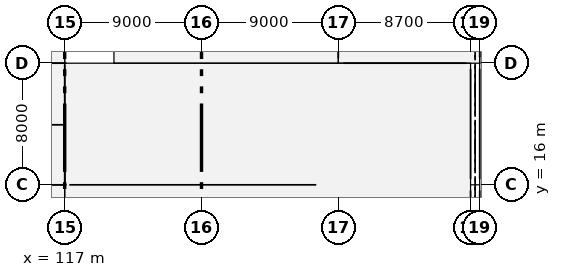
"""IFC4 building model, lengths in metres.
Left out: names, types, materials, properties, quantities, classifications, styles, units other than length and angle.
Written with IfcOpenShell. Run it as: python <this file> out.ifc"""

import sys

from ifc_helpers import new_model, si_unit, direction, frame, frame_2d, origin, origin_2d, place, context, subcontext, project, spatial, rectangle, hollow_rectangle, extrude, element, fill, save


model = new_model("IFC4")
c1 = context("Model", 3, precision=1e-05, world=origin(), true_north=direction((0.0, 1.0)))
c2 = subcontext(c1, "Body", "Model", "MODEL_VIEW")
j1 = project(units=[si_unit("LENGTHUNIT", "METRE"), si_unit("PLANEANGLEUNIT", "RADIAN")], contexts=[c1])
p1 = place(None, origin())
s1 = spatial("IfcSite", under=j1, at=p1, CompositionType="ELEMENT")
p2 = place(p1, origin())
s2 = spatial("IfcBuilding", under=s1, at=p2, CompositionType="ELEMENT")
p3 = place(p2, origin())
s3 = spatial("IfcBuildingStorey", under=s2, at=p3, CompositionType="ELEMENT", Elevation=0.0)
for number, where, z_axis, x_axis in (
    (1, (117.0, 16.0, -0.5), (0.0, 0.0, 1.0), (1.0, 0.0, 0.0)),
    (2, (117.0, 24.0, -0.5), (0.0, 0.0, 1.0), (1.0, 0.0, 0.0)),
    (3, (126.0, 16.0, -0.5), (0.0, 0.0, 1.0), (1.0, 0.0, 0.0)),
    (4, (126.0, 24.0, -0.5), (0.0, 0.0, 1.0), (1.0, 0.0, 0.0)),
    (5, (135.0, 16.0, -0.5), (0.0, 0.0, 1.0), (1.0, 0.0, 0.0)),
    (6, (135.0, 24.0, -0.5), (0.0, 0.0, 1.0), (1.0, 0.0, 0.0)),
):
    element("IfcColumn", number, at=place(p3, frame(where, z_axis=z_axis, x_axis=x_axis)), inside=s3, PredefinedType="COLUMN", context=c2, shape_type="SweptSolid", body=[
        extrude(rectangle(XDim=0.65, YDim=0.65, at=origin_2d()), origin(), (0.0, 0.0, 1.0), 6.8),
    ])
for number, where, z_axis, x_axis in (
    (7, (143.7, 16.0, -0.5), (0.0, 0.0, 1.0), (1.0, 0.0, 0.0)),
    (8, (143.7, 24.0, -0.5), (0.0, 0.0, 1.0), (1.0, 0.0, 0.0)),
    (9, (144.3, 16.0, -0.5), (0.0, 0.0, 1.0), (1.0, 0.0, 0.0)),
    (10, (144.3, 24.0, -0.5), (0.0, 0.0, 1.0), (1.0, 0.0, 0.0)),
):
    element("IfcColumn", number, at=place(p3, frame(where, z_axis=z_axis, x_axis=x_axis)), inside=s3, PredefinedType="COLUMN", context=c2, shape_type="SweptSolid", body=[
        extrude(rectangle(XDim=0.55, YDim=0.75, at=origin_2d()), origin(), (0.0, 0.0, 1.0), 6.8),
    ])
p4 = place(p3, frame((135.325, 24.0, 0.0), z_axis=(0.0, 0.0, 1.0), x_axis=(1.0, 0.0, 0.0)))
e11 = element("IfcWall", 11, at=p4, inside=s3, PredefinedType="SOLIDWALL", context=c2, shape_type="SweptSolid", body=[
    extrude(rectangle(XDim=8.1, YDim=0.3, at=frame_2d((4.05, 0.0))), origin(), (0.0, 0.0, 1.0), 0.45),
])
p5 = place(p3, frame((143.7, 8.375, 0.0), z_axis=(0.0, 0.0, 1.0), x_axis=(0.0, 1.0, 0.0)))
e12 = element("IfcWall", 12, at=p5, inside=s3, PredefinedType="SOLIDWALL", context=c2, shape_type="SweptSolid", body=[
    extrude(rectangle(XDim=7.25, YDim=0.34, at=frame_2d((3.625, 0.0))), origin(), (0.0, 0.0, 1.0), 4.98),
])
p6 = place(p5, frame((1.517, 0.0, 0.85)))
e13 = element("IfcOpeningElement", 13, at=p6, cuts=e12, PredefinedType="OPENING", context=c2, shape_type="SweptSolid", body=[
    extrude(rectangle(XDim=1.8, YDim=3.15, at=frame_2d((0.9, 1.575))), frame((0.0, 0.18, 0.0), z_axis=(0.0, -1.0, 0.0), x_axis=(1.0, 0.0, 0.0)), (0.0, 0.0, 1.0), 0.36),
])
p7 = place(p5, frame((3.933, 0.0, 0.85)))
e14 = element("IfcOpeningElement", 14, at=p7, cuts=e12, PredefinedType="OPENING", context=c2, shape_type="SweptSolid", body=[
    extrude(rectangle(XDim=1.8, YDim=3.15, at=frame_2d((0.9, 1.575))), frame((0.0, 0.18, 0.0), z_axis=(0.0, -1.0, 0.0), x_axis=(1.0, 0.0, 0.0)), (0.0, 0.0, 1.0), 0.36),
])
p8 = place(p3, frame((143.7, 16.375, 0.0), z_axis=(0.0, 0.0, 1.0), x_axis=(0.0, 1.0, 0.0)))
e15 = element("IfcWall", 15, at=p8, inside=s3, PredefinedType="SOLIDWALL", context=c2, shape_type="SweptSolid", body=[
    extrude(rectangle(XDim=7.25, YDim=0.34, at=frame_2d((3.625, 0.0))), origin(), (0.0, 0.0, 1.0), 4.98),
])
p9 = place(p8, frame((1.517, 0.0, 0.85)))
e16 = element("IfcOpeningElement", 16, at=p9, cuts=e15, PredefinedType="OPENING", context=c2, shape_type="SweptSolid", body=[
    extrude(rectangle(XDim=1.8, YDim=3.15, at=frame_2d((0.9, 1.575))), frame((0.0, 0.18, 0.0), z_axis=(0.0, -1.0, 0.0), x_axis=(1.0, 0.0, 0.0)), (0.0, 0.0, 1.0), 0.36),
])
p10 = place(p8, frame((3.933, 0.0, 0.85)))
e17 = element("IfcOpeningElement", 17, at=p10, cuts=e15, PredefinedType="OPENING", context=c2, shape_type="SweptSolid", body=[
    extrude(rectangle(XDim=1.8, YDim=3.15, at=frame_2d((0.9, 1.575))), frame((0.0, 0.18, 0.0), z_axis=(0.0, -1.0, 0.0), x_axis=(1.0, 0.0, 0.0)), (0.0, 0.0, 1.0), 0.36),
])
p11 = place(p3, frame((135.0, 24.325, 0.0), z_axis=(0.0, 0.0, 1.0), x_axis=(0.0, 1.0, 0.0)))
e18 = element("IfcWall", 18, at=p11, inside=s3, PredefinedType="SOLIDWALL", context=c2, shape_type="SweptSolid", body=[
    extrude(rectangle(XDim=5.925, YDim=0.34, at=frame_2d((2.962, 0.0))), origin(), (0.0, 0.0, 1.0), 5.35),
])
p12 = place(p11, frame((0.619, 0.0, 0.85)))
e19 = element("IfcOpeningElement", 19, at=p12, cuts=e18, PredefinedType="OPENING", context=c2, shape_type="SweptSolid", body=[
    extrude(rectangle(XDim=2.0, YDim=3.3, at=frame_2d((1.0, 1.65))), frame((0.0, 0.18, 0.0), z_axis=(0.0, -1.0, 0.0), x_axis=(1.0, 0.0, 0.0)), (0.0, 0.0, 1.0), 0.36),
])
p13 = place(p11, frame((2.82, 0.0, 0.85)))
e20 = element("IfcOpeningElement", 20, at=p13, cuts=e18, PredefinedType="OPENING", context=c2, shape_type="SweptSolid", body=[
    extrude(rectangle(XDim=2.0, YDim=3.3, at=frame_2d((1.0, 1.65))), frame((0.0, 0.18, 0.0), z_axis=(0.0, -1.0, 0.0), x_axis=(1.0, 0.0, 0.0)), (0.0, 0.0, 1.0), 0.36),
])
p14 = place(p3, frame((144.3, 8.375, 0.0), z_axis=(0.0, 0.0, 1.0), x_axis=(0.0, 1.0, 0.0)))
e21 = element("IfcWall", 21, at=p14, inside=s3, PredefinedType="SOLIDWALL", context=c2, shape_type="SweptSolid", body=[
    extrude(rectangle(XDim=7.25, YDim=0.34, at=frame_2d((3.625, 0.0))), origin(), (0.0, 0.0, 1.0), 5.1),
])
p15 = place(p14, frame((1.517, 0.0, 0.85)))
e22 = element("IfcOpeningElement", 22, at=p15, cuts=e21, PredefinedType="OPENING", context=c2, shape_type="SweptSolid", body=[
    extrude(rectangle(XDim=1.8, YDim=3.15, at=frame_2d((0.9, 1.575))), frame((0.0, 0.18, 0.0), z_axis=(0.0, -1.0, 0.0), x_axis=(1.0, 0.0, 0.0)), (0.0, 0.0, 1.0), 0.36),
])
p16 = place(p14, frame((3.933, 0.0, 0.85)))
e23 = element("IfcOpeningElement", 23, at=p16, cuts=e21, PredefinedType="OPENING", context=c2, shape_type="SweptSolid", body=[
    extrude(rectangle(XDim=1.8, YDim=3.15, at=frame_2d((0.9, 1.575))), frame((0.0, 0.18, 0.0), z_axis=(0.0, -1.0, 0.0), x_axis=(1.0, 0.0, 0.0)), (0.0, 0.0, 1.0), 0.36),
])
p17 = place(p3, frame((144.3, 16.375, 0.0), z_axis=(0.0, 0.0, 1.0), x_axis=(0.0, 1.0, 0.0)))
e24 = element("IfcWall", 24, at=p17, inside=s3, PredefinedType="SOLIDWALL", context=c2, shape_type="SweptSolid", body=[
    extrude(rectangle(XDim=7.25, YDim=0.34, at=frame_2d((3.625, 0.0))), origin(), (0.0, 0.0, 1.0), 5.1),
])
p18 = place(p17, frame((1.417, 0.0, 0.85)))
e25 = element("IfcOpeningElement", 25, at=p18, cuts=e24, PredefinedType="OPENING", context=c2, shape_type="SweptSolid", body=[
    extrude(rectangle(XDim=2.0, YDim=3.3, at=frame_2d((1.0, 1.65))), frame((0.0, 0.18, 0.0), z_axis=(0.0, -1.0, 0.0), x_axis=(1.0, 0.0, 0.0)), (0.0, 0.0, 1.0), 0.36),
])
p19 = place(p17, frame((3.833, 0.0, 0.85)))
e26 = element("IfcOpeningElement", 26, at=p19, cuts=e24, PredefinedType="OPENING", context=c2, shape_type="SweptSolid", body=[
    extrude(rectangle(XDim=2.0, YDim=3.3, at=frame_2d((1.0, 1.65))), frame((0.0, 0.18, 0.0), z_axis=(0.0, -1.0, 0.0), x_axis=(1.0, 0.0, 0.0)), (0.0, 0.0, 1.0), 0.36),
])
p20 = place(p3, frame((144.3, 24.375, 0.0), z_axis=(0.0, 0.0, 1.0), x_axis=(0.0, 1.0, 0.0)))
e27 = element("IfcWall", 27, at=p20, inside=s3, PredefinedType="SOLIDWALL", context=c2, shape_type="SweptSolid", body=[
    extrude(rectangle(XDim=7.25, YDim=0.34, at=frame_2d((3.625, 0.0))), origin(), (0.0, 0.0, 1.0), 5.1),
])
p21 = place(p20, frame((1.112, 0.0, 0.85)))
e28 = element("IfcOpeningElement", 28, at=p21, cuts=e27, PredefinedType="OPENING", context=c2, shape_type="SweptSolid", body=[
    extrude(rectangle(XDim=1.8, YDim=3.15, at=frame_2d((0.9, 1.575))), frame((0.0, 0.18, 0.0), z_axis=(0.0, -1.0, 0.0), x_axis=(1.0, 0.0, 0.0)), (0.0, 0.0, 1.0), 0.36),
])
p22 = place(p20, frame((3.933, 0.0, 0.85)))
e29 = element("IfcOpeningElement", 29, at=p22, cuts=e27, PredefinedType="OPENING", context=c2, shape_type="SweptSolid", body=[
    extrude(rectangle(XDim=1.8, YDim=3.15, at=frame_2d((0.9, 1.575))), frame((0.0, 0.18, 0.0), z_axis=(0.0, -1.0, 0.0), x_axis=(1.0, 0.0, 0.0)), (0.0, 0.0, 1.0), 0.36),
])
p23 = place(p3, frame((117.125, 16.0, -0.5), z_axis=(0.0, 0.0, 1.0), x_axis=(-1.0, 0.0, 0.0)))
e30 = element("IfcWall", 30, at=p23, inside=s3, PredefinedType="SOLIDWALL", context=c2, shape_type="SweptSolid", body=[
    extrude(rectangle(XDim=9.25, YDim=0.25, at=frame_2d((4.625, 0.0))), origin(), (0.0, 0.0, 1.0), 6.8),
])
p24 = place(p23, frame((7.225, 0.0, 0.5)))
e31 = element("IfcOpeningElement", 31, at=p24, cuts=e30, PredefinedType="OPENING", context=c2, shape_type="SweptSolid", body=[
    extrude(rectangle(XDim=1.2, YDim=2.2, at=frame_2d((0.6, 1.1))), frame((0.0, 0.135, 0.0), z_axis=(0.0, -1.0, 0.0), x_axis=(1.0, 0.0, 0.0)), (0.0, 0.0, 1.0), 0.27),
])
p25 = place(p3, frame((107.875, 24.0, -0.5), z_axis=(0.0, 0.0, 1.0), x_axis=(1.0, 0.0, 0.0)))
e32 = element("IfcWall", 32, at=p25, inside=s3, PredefinedType="SOLIDWALL", context=c2, shape_type="SweptSolid", body=[
    extrude(rectangle(XDim=9.25, YDim=0.25, at=frame_2d((4.625, 0.0))), origin(), (0.0, 0.0, 1.0), 6.8),
])
p26 = place(p25, frame((5.775, 0.0, 0.5)))
e33 = element("IfcOpeningElement", 33, at=p26, cuts=e32, PredefinedType="OPENING", context=c2, shape_type="SweptSolid", body=[
    extrude(rectangle(XDim=1.6, YDim=2.2, at=frame_2d((0.8, 1.1))), frame((0.0, 0.135, 0.0), z_axis=(0.0, -1.0, 0.0), x_axis=(1.0, 0.0, 0.0)), (0.0, 0.0, 1.0), 0.27),
])
p27 = place(p3, frame((117.0, 16.125, -0.5), z_axis=(0.0, 0.0, 1.0), x_axis=(0.0, 1.0, 0.0)))
e34 = element("IfcWall", 34, at=p27, inside=s3, PredefinedType="SOLIDWALL", context=c2, shape_type="SweptSolid", body=[
    extrude(rectangle(XDim=7.75, YDim=0.25, at=frame_2d((3.875, 0.0))), origin(), (0.0, 0.0, 1.0), 6.8),
])
p28 = place(p3, frame((108.125, 19.95, -0.5), z_axis=(0.0, 0.0, 1.0), x_axis=(1.0, 0.0, 0.0)))
e35 = element("IfcWall", 35, at=p28, inside=s3, PredefinedType="SOLIDWALL", context=c2, shape_type="SweptSolid", body=[
    extrude(rectangle(XDim=8.75, YDim=0.25, at=frame_2d((4.375, 0.0))), origin(), (0.0, 0.0, 1.0), 6.8),
])
for number, where, z_axis, x_axis in (
    (36, (133.875, 17.275, -0.5), (0.0, 0.0, 1.0), (1.0, 0.0, 0.0)),
    (37, (142.725, 17.275, -0.5), (0.0, 0.0, 1.0), (1.0, 0.0, 0.0)),
    (38, (133.875, 21.525, -0.5), (0.0, 0.0, 1.0), (1.0, 0.0, 0.0)),
    (39, (142.725, 21.525, -0.5), (0.0, 0.0, 1.0), (1.0, 0.0, 0.0)),
):
    element("IfcColumn", number, at=place(p3, frame(where, z_axis=z_axis, x_axis=x_axis)), inside=s3, PredefinedType="COLUMN", context=c2, shape_type="SweptSolid", body=[
        extrude(hollow_rectangle(XDim=0.2, YDim=0.2, WallThickness=0.01, InnerFilletRadius=0.01, OuterFilletRadius=0.02, at=origin_2d()), origin(), (0.0, 0.0, 1.0), 6.8),
    ])
p29 = place(p3, frame((117.3, 16.0, 0.0), z_axis=(0.0, 0.0, 1.0), x_axis=(1.0, 0.0, 0.0)))
e40 = element("IfcWall", 40, at=p29, inside=s3, PredefinedType="STANDARD", context=c2, shape_type="SweptSolid", body=[
    extrude(rectangle(XDim=16.25, YDim=0.195, at=frame_2d((8.125, 0.0))), origin(), (0.0, 0.0, 1.0), 5.13),
])
p30 = place(p29, frame((3.5, 0.0, 0.0)))
e41 = element("IfcOpeningElement", 41, at=p30, cuts=e40, PredefinedType="OPENING", context=c2, shape_type="SweptSolid", body=[
    extrude(rectangle(XDim=1.7, YDim=2.4, at=frame_2d((0.85, 1.2))), frame((0.0, 0.107, 0.0), z_axis=(0.0, -1.0, 0.0), x_axis=(1.0, 0.0, 0.0)), (0.0, 0.0, 1.0), 0.215),
])
p31 = place(p9, origin())
e42 = element("IfcWindow", 42, at=p31, inside=s3, PartitioningType="DOUBLE_PANEL_VERTICAL", PredefinedType="WINDOW", context=c2, shape_type="SweptSolid", body=[
    extrude(rectangle(XDim=1.8, YDim=3.15, at=frame_2d((0.9, 1.575))), frame((0.0, 0.03, 0.0), z_axis=(0.0, -1.0, 0.0), x_axis=(1.0, 0.0, 0.0)), (0.0, 0.0, 1.0), 0.06),
])
fill(e16, e42)
p32 = place(p10, origin())
e43 = element("IfcWindow", 43, at=p32, inside=s3, PartitioningType="DOUBLE_PANEL_VERTICAL", PredefinedType="WINDOW", context=c2, shape_type="SweptSolid", body=[
    extrude(rectangle(XDim=1.8, YDim=3.15, at=frame_2d((0.9, 1.575))), frame((0.0, 0.03, 0.0), z_axis=(0.0, -1.0, 0.0), x_axis=(1.0, 0.0, 0.0)), (0.0, 0.0, 1.0), 0.06),
])
fill(e17, e43)
p33 = place(p18, origin())
e44 = element("IfcWindow", 44, at=p33, inside=s3, PartitioningType="DOUBLE_PANEL_VERTICAL", PredefinedType="WINDOW", context=c2, shape_type="SweptSolid", body=[
    extrude(rectangle(XDim=2.0, YDim=3.3, at=frame_2d((1.0, 1.65))), frame((0.0, 0.03, 0.0), z_axis=(0.0, -1.0, 0.0), x_axis=(1.0, 0.0, 0.0)), (0.0, 0.0, 1.0), 0.06),
])
fill(e25, e44)
p34 = place(p19, origin())
e45 = element("IfcWindow", 45, at=p34, inside=s3, PartitioningType="DOUBLE_PANEL_VERTICAL", PredefinedType="WINDOW", context=c2, shape_type="SweptSolid", body=[
    extrude(rectangle(XDim=2.0, YDim=3.3, at=frame_2d((1.0, 1.65))), frame((0.0, 0.03, 0.0), z_axis=(0.0, -1.0, 0.0), x_axis=(1.0, 0.0, 0.0)), (0.0, 0.0, 1.0), 0.06),
])
fill(e26, e45)
p35 = place(p30, origin())
e46 = element("IfcDoor", 46, at=p35, inside=s3, OperationType="SLIDING_TO_LEFT", PredefinedType="DOOR", context=c2, shape_type="SweptSolid", body=[
    extrude(rectangle(XDim=1.7, YDim=2.4, at=frame_2d((0.85, 1.2))), frame((0.0, 0.025, 0.0), z_axis=(0.0, -1.0, 0.0), x_axis=(1.0, 0.0, 0.0)), (0.0, 0.0, 1.0), 0.05),
])
fill(e41, e46)
save(model, sys.argv[1])
